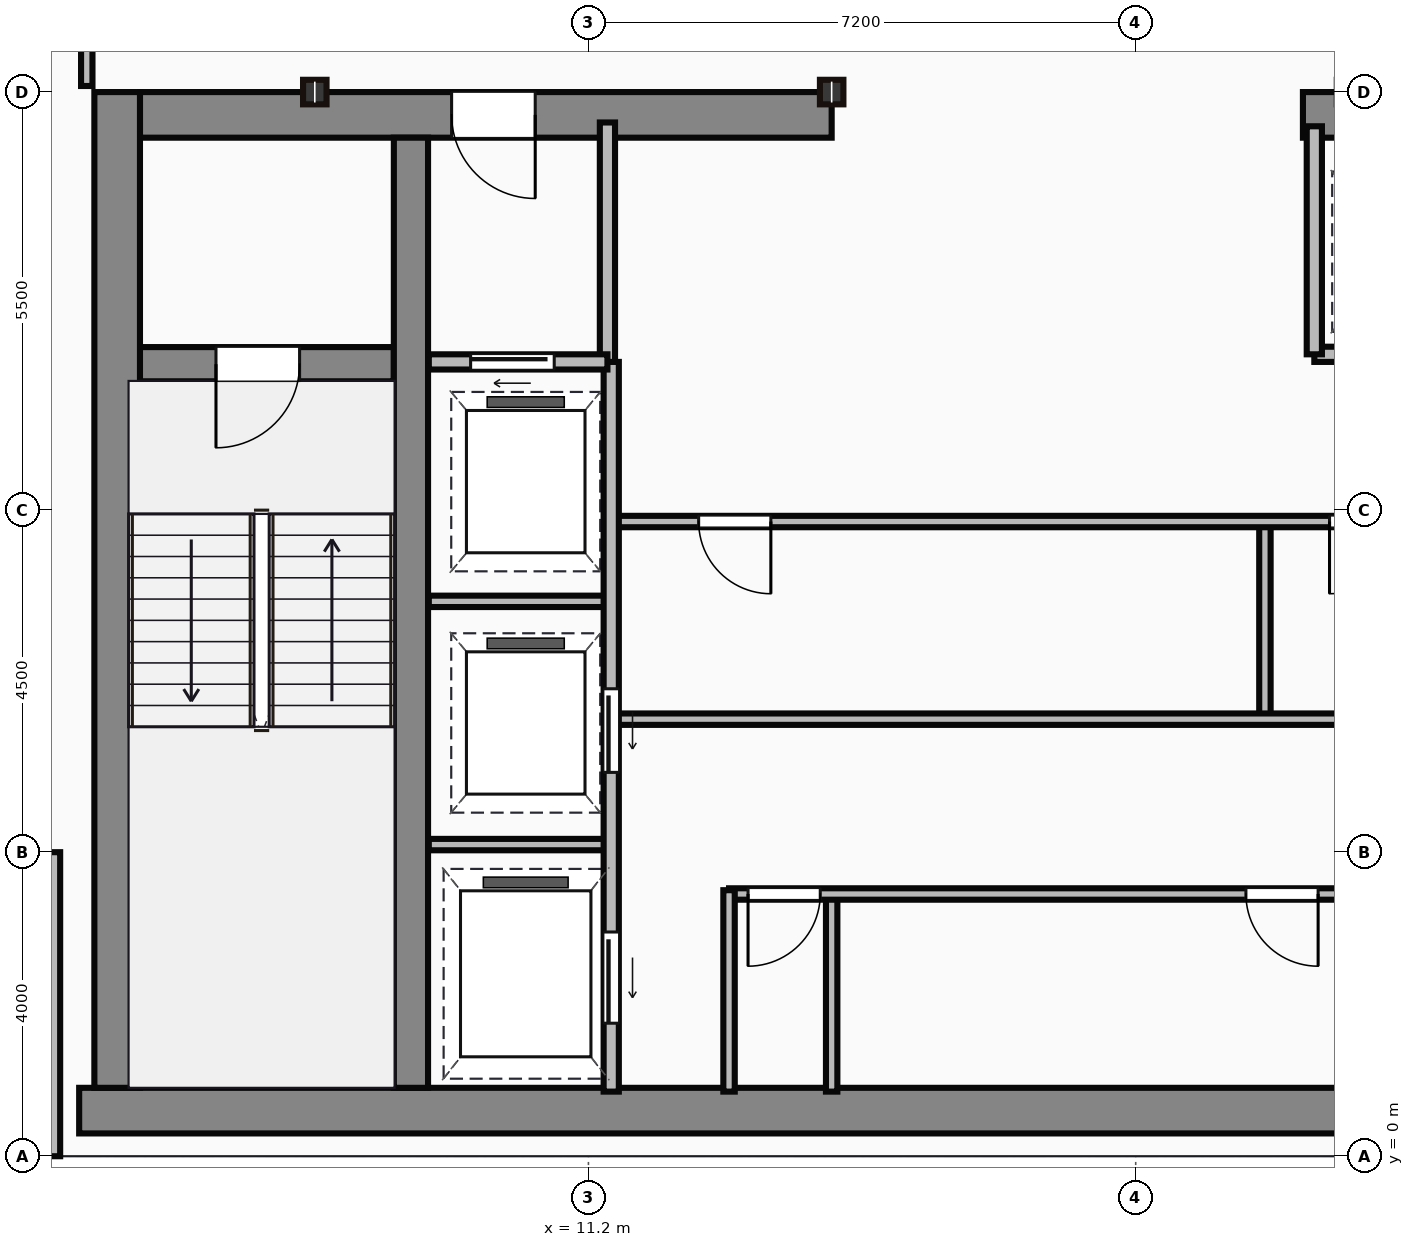
"""IFC4 building model, lengths in metres.
Left out: names, types, materials, properties, quantities, classifications, styles, units other than length and angle.
Written with IfcOpenShell. Run it as: python <this file> out.ifc"""

import sys

from ifc_helpers import new_model, si_unit, direction, frame, frame_2d, origin, origin_2d, place, context, subcontext, project, spatial, rectangle, i_section, extrude, source, transform, mapped, element, fill, save


model = new_model("IFC4")
c1 = context("Model", 3, precision=1e-05, world=origin(), true_north=direction((0.0, 1.0)))
c2 = subcontext(c1, "Body", "Model", "MODEL_VIEW")
j1 = project(units=[si_unit("LENGTHUNIT", "METRE"), si_unit("PLANEANGLEUNIT", "RADIAN")], contexts=[c1])
p1 = place(None, origin())
s1 = spatial("IfcSite", under=j1, at=p1, CompositionType="ELEMENT")
p2 = place(p1, origin())
s2 = spatial("IfcBuilding", under=s1, at=p2, CompositionType="ELEMENT")
p3 = place(p2, frame((0.0, 0.0, 258.8)))
s3 = spatial("IfcBuildingStorey", under=s2, at=p3, CompositionType="ELEMENT", Elevation=258.8)
m1 = source(origin(), c2, "Body", "SweptSolid", [
    extrude(rectangle(XDim=29.5, YDim=0.6, at=frame_2d((14.75, 0.0))), origin(), (0.0, 0.0, 1.0), 3.65),
])
p4 = place(p3, frame((4.5, 0.6, 0.0), z_axis=(0.0, 0.0, 1.0), x_axis=(1.0, 0.0, 0.0)))
e1 = element("IfcWall", 1, at=p4, inside=s3, PredefinedType="SHEAR", context=c2, shape_type="MappedRepresentation", body=[
    mapped(m1, transform((0.0, 0.0, 0.0))),
])
m2 = source(origin(), c2, "Body", "SweptSolid", [
    extrude(rectangle(XDim=13.1, YDim=0.6, at=frame_2d((6.55, 0.0))), origin(), (0.0, 0.0, 1.0), 3.65),
])
p5 = place(p3, frame((5.0, 0.9, 0.0), z_axis=(0.0, 0.0, 1.0), x_axis=(0.0, 1.0, 0.0)))
e2 = element("IfcWall", 2, at=p5, inside=s3, PredefinedType="SHEAR", context=c2, shape_type="MappedRepresentation", body=[
    mapped(m2, transform((0.0, 0.0, 0.0))),
])
m3 = source(origin(), c2, "Body", "SweptSolid", [
    extrude(rectangle(XDim=9.1, YDim=0.6, at=frame_2d((4.55, 0.0))), origin(), (0.0, 0.0, 1.0), 3.65),
])
p6 = place(p3, frame((5.3, 13.7, 0.0), z_axis=(0.0, 0.0, 1.0), x_axis=(1.0, 0.0, 0.0)))
e3 = element("IfcWall", 3, at=p6, inside=s3, PredefinedType="SHEAR", context=c2, shape_type="MappedRepresentation", body=[
    mapped(m3, transform((0.0, 0.0, 0.0))),
])
p7 = place(p6, frame((4.1, 0.0, 0.0)))
e4 = element("IfcOpeningElement", 4, at=p7, cuts=e3, PredefinedType="OPENING", context=c2, shape_type="SweptSolid", body=[
    extrude(rectangle(XDim=1.1, YDim=2.15, at=frame_2d((0.55, 1.075))), frame((0.0, 0.31, 0.0), z_axis=(0.0, -1.0, 0.0), x_axis=(1.0, 0.0, 0.0)), (0.0, 0.0, 1.0), 0.62),
])
m4 = source(origin(), c2, "Body", "SweptSolid", [
    extrude(rectangle(XDim=12.6, YDim=0.6, at=frame_2d((6.3, 0.0))), origin(), (0.0, 0.0, 1.0), 3.65),
])
p8 = place(p3, frame((20.6, 13.7, 0.0), z_axis=(0.0, 0.0, 1.0), x_axis=(1.0, 0.0, 0.0)))
e5 = element("IfcWall", 5, at=p8, inside=s3, PredefinedType="SHEAR", context=c2, shape_type="MappedRepresentation", body=[
    mapped(m4, transform((0.0, 0.0, 0.0))),
])
p9 = place(p8, frame((9.25, 0.0, 0.0)))
e6 = element("IfcOpeningElement", 6, at=p9, cuts=e5, PredefinedType="OPENING", context=c2, shape_type="SweptSolid", body=[
    extrude(rectangle(XDim=1.1, YDim=2.15, at=frame_2d((0.55, 1.075))), frame((0.0, 0.31, 0.0), z_axis=(0.0, -1.0, 0.0), x_axis=(1.0, 0.0, 0.0)), (0.0, 0.0, 1.0), 0.62),
])
m5 = source(origin(), c2, "Body", "SweptSolid", [
    extrude(rectangle(XDim=12.5, YDim=0.45, at=frame_2d((6.25, 0.0))), origin(), (0.0, 0.0, 1.0), 3.65),
])
p10 = place(p3, frame((8.865, 0.9, 0.0), z_axis=(0.0, 0.0, 1.0), x_axis=(0.0, 1.0, 0.0)))
e7 = element("IfcWall", 7, at=p10, inside=s3, PredefinedType="SHEAR", context=c2, shape_type="MappedRepresentation", body=[
    mapped(m5, transform((0.0, 0.0, 0.0))),
])
m6 = source(origin(), c2, "Body", "SweptSolid", [
    extrude(rectangle(XDim=3.39, YDim=0.45, at=frame_2d((1.695, 0.0))), origin(), (0.0, 0.0, 1.0), 3.65),
])
p11 = place(p3, frame((5.25, 10.42, 0.0), z_axis=(0.0, 0.0, 1.0), x_axis=(1.0, 0.0, 0.0)))
e8 = element("IfcWall", 8, at=p11, inside=s3, PredefinedType="SHEAR", context=c2, shape_type="MappedRepresentation", body=[
    mapped(m6, transform((0.0, 0.0, 0.0))),
])
p12 = place(p11, frame((1.05, 0.0, 0.0)))
e9 = element("IfcOpeningElement", 9, at=p12, cuts=e8, PredefinedType="OPENING", context=c2, shape_type="SweptSolid", body=[
    extrude(rectangle(XDim=1.1, YDim=2.15, at=frame_2d((0.55, 1.075))), frame((0.0, 0.235, 0.0), z_axis=(0.0, -1.0, 0.0), x_axis=(1.0, 0.0, 0.0)), (0.0, 0.0, 1.0), 0.47),
])
m7 = source(origin(), c2, "Body", "SweptSolid", [
    extrude(i_section(OverallWidth=0.309, OverallDepth=0.323, WebThickness=0.014, FlangeThickness=0.023, at=origin_2d()), origin(), (0.0, 0.0, 1.0), 3.65),
])
for number, where, z_axis, x_axis in (
    (10, (7.6, 14.0, 0.0), (0.0, 0.0, 1.0), (1.0, 0.0, 0.0)),
    (11, (14.4, 14.0, 0.0), (0.0, 0.0, 1.0), (1.0, 0.0, 0.0)),
):
    element("IfcColumn", number, at=place(p3, frame(where, z_axis=z_axis, x_axis=x_axis)), inside=s3, PredefinedType="COLUMN", context=c2, shape_type="MappedRepresentation", body=[
        mapped(m7, transform((0.0, 0.0, 0.0))),
    ])
m8 = source(origin(), c2, "Body", "SweptSolid", [
    extrude(rectangle(XDim=4.0, YDim=0.25, at=frame_2d((2.0, 0.0))), origin(), (0.0, 0.0, 1.0), 3.4),
])
p13 = place(p3, frame((4.125, 4.0, 0.0), z_axis=(0.0, 0.0, 1.0), x_axis=(0.0, -1.0, 0.0)))
e12 = element("IfcWall", 12, at=p13, inside=s3, PredefinedType="STANDARD", context=c2, shape_type="MappedRepresentation", body=[
    mapped(m8, transform((0.0, 0.0, 0.0))),
])
m9 = source(origin(), c2, "Body", "SweptSolid", [
    extrude(rectangle(XDim=3.18, YDim=0.2, at=frame_2d((1.59, 0.0))), origin(), (0.0, 0.0, 1.0), 3.4),
])
p14 = place(p3, frame((11.45, 10.42, 0.0), z_axis=(0.0, 0.0, 1.0), x_axis=(0.0, 1.0, 0.0)))
e13 = element("IfcWall", 13, at=p14, inside=s3, PredefinedType="PARTITIONING", context=c2, shape_type="MappedRepresentation", body=[
    mapped(m9, transform((0.0, 0.0, 0.0))),
])
m10 = source(origin(), c2, "Body", "SweptSolid", [
    extrude(rectangle(XDim=2.35, YDim=0.2, at=frame_2d((1.175, 0.0))), origin(), (0.0, 0.0, 1.0), 3.4),
])
p15 = place(p3, frame((9.1, 10.45, 0.0), z_axis=(0.0, 0.0, 1.0), x_axis=(1.0, 0.0, 0.0)))
e14 = element("IfcWall", 14, at=p15, inside=s3, PredefinedType="PARTITIONING", context=c2, shape_type="MappedRepresentation", body=[
    mapped(m10, transform((0.0, 0.0, 0.0))),
])
p16 = place(p15, frame((0.55, 0.0, 0.0)))
e15 = element("IfcOpeningElement", 15, at=p16, cuts=e14, PredefinedType="OPENING", context=c2, shape_type="SweptSolid", body=[
    extrude(rectangle(XDim=1.1, YDim=2.15, at=frame_2d((0.55, 1.075))), frame((0.0, 0.11, 0.0), z_axis=(0.0, -1.0, 0.0), x_axis=(1.0, 0.0, 0.0)), (0.0, 0.0, 1.0), 0.22),
])
m11 = source(origin(), c2, "Body", "SweptSolid", [
    extrude(rectangle(XDim=9.6, YDim=0.2, at=frame_2d((4.8, 0.0))), origin(), (0.0, 0.0, 1.0), 3.4),
])
p17 = place(p3, frame((11.5, 0.85, 0.0), z_axis=(0.0, 0.0, 1.0), x_axis=(0.0, 1.0, 0.0)))
e16 = element("IfcWall", 16, at=p17, inside=s3, PredefinedType="PARTITIONING", context=c2, shape_type="MappedRepresentation", body=[
    mapped(m11, transform((0.0, 0.0, 0.0))),
])
p18 = place(p17, frame((4.2, 0.0, 0.0)))
e17 = element("IfcOpeningElement", 17, at=p18, cuts=e16, PredefinedType="OPENING", context=c2, shape_type="SweptSolid", body=[
    extrude(rectangle(XDim=1.1, YDim=2.15, at=frame_2d((0.55, 1.075))), frame((0.0, 0.11, 0.0), z_axis=(0.0, -1.0, 0.0), x_axis=(1.0, 0.0, 0.0)), (0.0, 0.0, 1.0), 0.22),
])
p19 = place(p17, frame((0.9, 0.0, 0.0)))
e18 = element("IfcOpeningElement", 18, at=p19, cuts=e16, PredefinedType="OPENING", context=c2, shape_type="SweptSolid", body=[
    extrude(rectangle(XDim=1.2, YDim=2.15, at=frame_2d((0.6, 1.075))), frame((0.0, 0.11, 0.0), z_axis=(0.0, -1.0, 0.0), x_axis=(1.0, 0.0, 0.0)), (0.0, 0.0, 1.0), 0.22),
])
m12 = source(origin(), c2, "Body", "SweptSolid", [
    extrude(rectangle(XDim=2.4, YDim=0.15, at=frame_2d((1.2, 0.0))), origin(), (0.0, 0.0, 1.0), 3.4),
])
for number, where, z_axis, x_axis in (
    (19, (9.1, 4.1, 0.0), (0.0, 0.0, 1.0), (1.0, 0.0, 0.0)),
    (20, (9.1, 7.3, 0.0), (0.0, 0.0, 1.0), (1.0, 0.0, 0.0)),
):
    element("IfcWall", number, at=place(p3, frame(where, z_axis=z_axis, x_axis=x_axis)), inside=s3, PredefinedType="PARTITIONING", context=c2, shape_type="MappedRepresentation", body=[
        mapped(m12, transform((0.0, 0.0, 0.0))),
    ])
m13 = source(origin(), c2, "Body", "SweptSolid", [
    extrude(rectangle(XDim=2.65, YDim=0.15, at=frame_2d((1.325, 0.0))), origin(), (0.0, 0.0, 1.0), 3.4),
])
p20 = place(p3, frame((13.05, 0.85, 0.0), z_axis=(0.0, 0.0, 1.0), x_axis=(0.0, 1.0, 0.0)))
e21 = element("IfcWall", 21, at=p20, inside=s3, PredefinedType="PARTITIONING", context=c2, shape_type="MappedRepresentation", body=[
    mapped(m13, transform((0.0, 0.0, 0.0))),
])
m14 = source(origin(), c2, "Body", "SweptSolid", [
    extrude(rectangle(XDim=10.35, YDim=0.15, at=frame_2d((5.175, 0.0))), origin(), (0.0, 0.0, 1.0), 3.4),
])
p21 = place(p3, frame((13.05, 3.45, 0.0), z_axis=(0.0, 0.0, 1.0), x_axis=(1.0, 0.0, 0.0)))
e22 = element("IfcWall", 22, at=p21, inside=s3, PredefinedType="PARTITIONING", context=c2, shape_type="MappedRepresentation", body=[
    mapped(m14, transform((0.0, 0.0, 0.0))),
])
p22 = place(p21, frame((0.25, 0.0, 0.0)))
e23 = element("IfcOpeningElement", 23, at=p22, cuts=e22, PredefinedType="OPENING", context=c2, shape_type="SweptSolid", body=[
    extrude(rectangle(XDim=0.95, YDim=2.15, at=frame_2d((0.475, 1.075))), frame((0.0, 0.085, 0.0), z_axis=(0.0, -1.0, 0.0), x_axis=(1.0, 0.0, 0.0)), (0.0, 0.0, 1.0), 0.17),
])
p23 = place(p21, frame((6.8, 0.0, 0.0)))
e24 = element("IfcOpeningElement", 24, at=p23, cuts=e22, PredefinedType="OPENING", context=c2, shape_type="SweptSolid", body=[
    extrude(rectangle(XDim=0.95, YDim=2.15, at=frame_2d((0.475, 1.075))), frame((0.0, 0.085, 0.0), z_axis=(0.0, -1.0, 0.0), x_axis=(1.0, 0.0, 0.0)), (0.0, 0.0, 1.0), 0.17),
])
m15 = source(origin(), c2, "Body", "SweptSolid", [
    extrude(rectangle(XDim=2.6, YDim=0.15, at=frame_2d((1.3, 0.0))), origin(), (0.0, 0.0, 1.0), 3.4),
])
p24 = place(p3, frame((14.4, 0.85, 0.0), z_axis=(0.0, 0.0, 1.0), x_axis=(0.0, 1.0, 0.0)))
e25 = element("IfcWall", 25, at=p24, inside=s3, PredefinedType="PARTITIONING", context=c2, shape_type="MappedRepresentation", body=[
    mapped(m15, transform((0.0, 0.0, 0.0))),
])
m16 = source(origin(), c2, "Body", "SweptSolid", [
    extrude(rectangle(XDim=11.85, YDim=0.15, at=frame_2d((5.925, 0.0))), origin(), (0.0, 0.0, 1.0), 3.4),
])
p25 = place(p3, frame((11.55, 5.75, 0.0), z_axis=(0.0, 0.0, 1.0), x_axis=(1.0, 0.0, 0.0)))
e26 = element("IfcWall", 26, at=p25, inside=s3, PredefinedType="PARTITIONING", context=c2, shape_type="MappedRepresentation", body=[
    mapped(m16, transform((0.0, 0.0, 0.0))),
])
p26 = place(p3, frame((11.55, 8.35, 0.0), z_axis=(0.0, 0.0, 1.0), x_axis=(1.0, 0.0, 0.0)))
e27 = element("IfcWall", 27, at=p26, inside=s3, PredefinedType="PARTITIONING", context=c2, shape_type="MappedRepresentation", body=[
    mapped(m16, transform((0.0, 0.0, 0.0))),
])
p27 = place(p26, frame((1.1, 0.0, 0.0)))
e28 = element("IfcOpeningElement", 28, at=p27, cuts=e27, PredefinedType="OPENING", context=c2, shape_type="SweptSolid", body=[
    extrude(rectangle(XDim=0.95, YDim=2.15, at=frame_2d((0.475, 1.075))), frame((0.0, 0.085, 0.0), z_axis=(0.0, -1.0, 0.0), x_axis=(1.0, 0.0, 0.0)), (0.0, 0.0, 1.0), 0.17),
])
p28 = place(p26, frame((9.4, 0.0, 0.0)))
e29 = element("IfcOpeningElement", 29, at=p28, cuts=e27, PredefinedType="OPENING", context=c2, shape_type="SweptSolid", body=[
    extrude(rectangle(XDim=0.95, YDim=2.15, at=frame_2d((0.475, 1.075))), frame((0.0, 0.085, 0.0), z_axis=(0.0, -1.0, 0.0), x_axis=(1.0, 0.0, 0.0)), (0.0, 0.0, 1.0), 0.17),
])
m17 = source(origin(), c2, "Body", "SweptSolid", [
    extrude(rectangle(XDim=2.5, YDim=0.15, at=frame_2d((1.25, 0.0))), origin(), (0.0, 0.0, 1.0), 3.4),
])
p29 = place(p3, frame((20.1, 5.8, 0.0), z_axis=(0.0, 0.0, 1.0), x_axis=(0.0, 1.0, 0.0)))
e30 = element("IfcWall", 30, at=p29, inside=s3, PredefinedType="PARTITIONING", context=c2, shape_type="MappedRepresentation", body=[
    mapped(m17, transform((0.0, 0.0, 0.0))),
])
m18 = source(origin(), c2, "Body", "SweptSolid", [
    extrude(rectangle(XDim=8.8, YDim=0.2, at=frame_2d((4.4, 0.0))), origin(), (0.0, 0.0, 1.0), 3.4),
])
p30 = place(p3, frame((20.75, 10.55, 0.0), z_axis=(0.0, 0.0, 1.0), x_axis=(1.0, 0.0, 0.0)))
e31 = element("IfcWall", 31, at=p30, inside=s3, PredefinedType="PARTITIONING", context=c2, shape_type="MappedRepresentation", body=[
    mapped(m18, transform((0.0, 0.0, 0.0))),
])
p31 = place(p30, frame((0.5, 0.0, 0.0)))
e32 = element("IfcOpeningElement", 32, at=p31, cuts=e31, PredefinedType="OPENING", context=c2, shape_type="SweptSolid", body=[
    extrude(rectangle(XDim=1.05, YDim=2.15, at=frame_2d((0.525, 1.075))), frame((0.0, 0.11, 0.0), z_axis=(0.0, -1.0, 0.0), x_axis=(1.0, 0.0, 0.0)), (0.0, 0.0, 1.0), 0.22),
])
p32 = place(p30, frame((2.6, 0.0, 0.0)))
e33 = element("IfcOpeningElement", 33, at=p32, cuts=e31, PredefinedType="OPENING", context=c2, shape_type="SweptSolid", body=[
    extrude(rectangle(XDim=1.05, YDim=2.15, at=frame_2d((0.525, 1.075))), frame((0.0, 0.11, 0.0), z_axis=(0.0, -1.0, 0.0), x_axis=(1.0, 0.0, 0.0)), (0.0, 0.0, 1.0), 0.22),
])
p33 = place(p30, frame((4.7, 0.0, 0.0)))
e34 = element("IfcOpeningElement", 34, at=p33, cuts=e31, PredefinedType="OPENING", context=c2, shape_type="SweptSolid", body=[
    extrude(rectangle(XDim=1.05, YDim=2.15, at=frame_2d((0.525, 1.075))), frame((0.0, 0.11, 0.0), z_axis=(0.0, -1.0, 0.0), x_axis=(1.0, 0.0, 0.0)), (0.0, 0.0, 1.0), 0.22),
])
p34 = place(p30, frame((6.8, 0.0, 0.0)))
e35 = element("IfcOpeningElement", 35, at=p34, cuts=e31, PredefinedType="OPENING", context=c2, shape_type="SweptSolid", body=[
    extrude(rectangle(XDim=1.05, YDim=2.15, at=frame_2d((0.525, 1.075))), frame((0.0, 0.11, 0.0), z_axis=(0.0, -1.0, 0.0), x_axis=(1.0, 0.0, 0.0)), (0.0, 0.0, 1.0), 0.22),
])
m19 = source(origin(), c2, "Body", "SweptSolid", [
    extrude(rectangle(XDim=3.0, YDim=0.2, at=frame_2d((1.5, 0.0))), origin(), (0.0, 0.0, 1.0), 3.4),
])
p35 = place(p3, frame((20.75, 10.55, 0.0), z_axis=(0.0, 0.0, 1.0), x_axis=(0.0, 1.0, 0.0)))
e36 = element("IfcWall", 36, at=p35, inside=s3, PredefinedType="PARTITIONING", context=c2, shape_type="MappedRepresentation", body=[
    mapped(m19, transform((0.0, 0.0, 0.0))),
])
m20 = source(origin(), c2, "Body", "SweptSolid", [
    extrude(rectangle(XDim=2.12, YDim=0.15, at=frame_2d((1.06, 0.0))), origin(), (0.0, 0.0, 1.0), 3.4),
])
p36 = place(p3, frame((4.6, 14.08, 0.0), z_axis=(0.0, 0.0, 1.0), x_axis=(0.0, 1.0, 0.0)))
e37 = element("IfcWall", 37, at=p36, inside=s3, PredefinedType="PARTITIONING", context=c2, shape_type="MappedRepresentation", body=[
    mapped(m20, transform((0.0, 0.0, 0.0))),
])
m21 = source(origin(), c2, "Body", "SweptSolid", [
    extrude(rectangle(XDim=1.1, YDim=2.15, at=frame_2d((0.55, 1.075))), frame((0.0, 0.025, 0.0), z_axis=(0.0, -1.0, 0.0), x_axis=(1.0, 0.0, 0.0)), (0.0, 0.0, 1.0), 0.05),
])
p37 = place(p12, frame((1.1, 0.0, 0.0), z_axis=(0.0, 0.0, 1.0), x_axis=(-1.0, 0.0, 0.0)))
e38 = element("IfcDoor", 38, at=p37, inside=s3, OperationType="SINGLE_SWING_LEFT", PredefinedType="DOOR", context=c2, shape_type="MappedRepresentation", body=[
    mapped(m21, transform((0.0, 0.0, 0.0))),
])
fill(e9, e38)
p38 = place(p7, origin())
e39 = element("IfcDoor", 39, at=p38, inside=s3, OperationType="SINGLE_SWING_RIGHT", PredefinedType="DOOR", context=c2, shape_type="MappedRepresentation", body=[
    mapped(m21, transform((0.0, 0.0, 0.0))),
])
fill(e4, e39)
p39 = place(p16, origin())
e40 = element("IfcDoor", 40, at=p39, inside=s3, OperationType="SLIDING_TO_LEFT", PredefinedType="DOOR", context=c2, shape_type="MappedRepresentation", body=[
    mapped(m21, transform((0.0, 0.0, 0.0))),
])
fill(e15, e40)
p40 = place(p18, frame((1.1, 0.0, 0.0), z_axis=(0.0, 0.0, 1.0), x_axis=(-1.0, 0.0, 0.0)))
e41 = element("IfcDoor", 41, at=p40, inside=s3, OperationType="SLIDING_TO_LEFT", PredefinedType="DOOR", context=c2, shape_type="MappedRepresentation", body=[
    mapped(m21, transform((0.0, 0.0, 0.0))),
])
fill(e17, e41)
m22 = source(origin(), c2, "Body", "SweptSolid", [
    extrude(rectangle(XDim=1.2, YDim=2.15, at=frame_2d((0.6, 1.075))), frame((0.0, 0.025, 0.0), z_axis=(0.0, -1.0, 0.0), x_axis=(1.0, 0.0, 0.0)), (0.0, 0.0, 1.0), 0.05),
])
p41 = place(p19, frame((1.2, 0.0, 0.0), z_axis=(0.0, 0.0, 1.0), x_axis=(-1.0, 0.0, 0.0)))
e42 = element("IfcDoor", 42, at=p41, inside=s3, OperationType="SLIDING_TO_LEFT", PredefinedType="DOOR", context=c2, shape_type="MappedRepresentation", body=[
    mapped(m22, transform((0.0, 0.0, 0.0))),
])
fill(e18, e42)
m23 = source(origin(), c2, "Body", "SweptSolid", [
    extrude(rectangle(XDim=0.95, YDim=2.15, at=frame_2d((0.475, 1.075))), frame((0.0, 0.025, 0.0), z_axis=(0.0, -1.0, 0.0), x_axis=(1.0, 0.0, 0.0)), (0.0, 0.0, 1.0), 0.05),
])
p42 = place(p22, origin())
e43 = element("IfcDoor", 43, at=p42, inside=s3, OperationType="SINGLE_SWING_LEFT", PredefinedType="DOOR", context=c2, shape_type="MappedRepresentation", body=[
    mapped(m23, transform((0.0, 0.0, 0.0))),
])
fill(e23, e43)
p43 = place(p23, origin())
e44 = element("IfcDoor", 44, at=p43, inside=s3, OperationType="SINGLE_SWING_RIGHT", PredefinedType="DOOR", context=c2, shape_type="MappedRepresentation", body=[
    mapped(m23, transform((0.0, 0.0, 0.0))),
])
fill(e24, e44)
p44 = place(p27, origin())
e45 = element("IfcDoor", 45, at=p44, inside=s3, OperationType="SINGLE_SWING_RIGHT", PredefinedType="DOOR", context=c2, shape_type="MappedRepresentation", body=[
    mapped(m23, transform((0.0, 0.0, 0.0))),
])
fill(e28, e45)
p45 = place(p28, origin())
e46 = element("IfcDoor", 46, at=p45, inside=s3, OperationType="SINGLE_SWING_LEFT", PredefinedType="DOOR", context=c2, shape_type="MappedRepresentation", body=[
    mapped(m23, transform((0.0, 0.0, 0.0))),
])
fill(e29, e46)
save(model, sys.argv[1])
